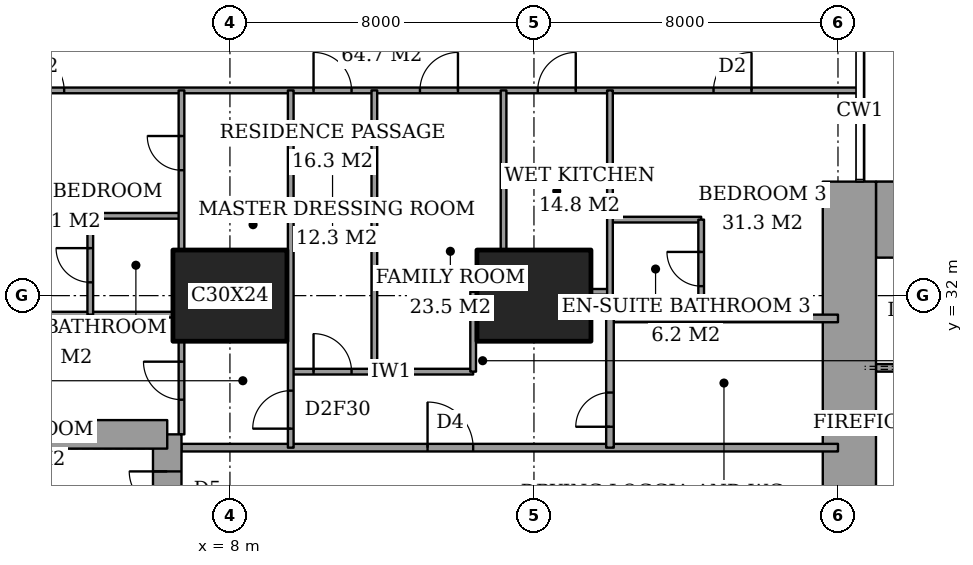
"""IFC4 building model, lengths in metres.
Left out: names, types, materials, properties, quantities, classifications, styles, units other than length and angle.
Written with IfcOpenShell. Run it as: python <this file> out.ifc"""

import sys

from ifc_helpers import new_model, si_unit, direction, frame, frame_2d, origin, origin_2d, place, context, subcontext, project, spatial, rectangle, extrude, element, fill, save


model = new_model("IFC4")
c1 = context("Model", 3, precision=1e-05, world=origin(), true_north=direction((0.0, 1.0)))
c2 = subcontext(c1, "Body", "Model", "MODEL_VIEW")
j1 = project(units=[si_unit("LENGTHUNIT", "METRE"), si_unit("PLANEANGLEUNIT", "RADIAN")], contexts=[c1])
p1 = place(None, origin())
s1 = spatial("IfcSite", under=j1, at=p1, CompositionType="ELEMENT")
p2 = place(p1, origin())
s2 = spatial("IfcBuilding", under=s1, at=p2, CompositionType="ELEMENT")
p3 = place(p2, frame((0.0, 0.0, 69.2)))
s3 = spatial("IfcBuildingStorey", under=s2, at=p3, CompositionType="ELEMENT", Elevation=69.2)
for number, where, z_axis, x_axis in (
    (1, (8.0, 32.0, 0.0), (0.0, 0.0, 1.0), (1.0, 0.0, 0.0)),
    (2, (16.0, 32.0, 0.0), (0.0, 0.0, 1.0), (1.0, 0.0, 0.0)),
):
    element("IfcColumn", number, at=place(p3, frame(where, z_axis=z_axis, x_axis=x_axis)), inside=s3, PredefinedType="COLUMN", context=c2, shape_type="SweptSolid", body=[
        extrude(rectangle(XDim=3.0, YDim=2.4, at=origin_2d()), origin(), (0.0, 0.0, 1.0), 3.6),
    ])
p4 = place(p3, frame((25.0, 34.0, 0.0), z_axis=(0.0, 0.0, 1.0), x_axis=(1.0, 0.0, 0.0)))
e3 = element("IfcWall", 3, at=p4, inside=s3, PredefinedType="SHEAR", context=c2, shape_type="SweptSolid", body=[
    extrude(rectangle(XDim=3.15, YDim=2.0, at=frame_2d((1.575, 0.0))), origin(), (0.0, 0.0, 1.0), 3.6),
])
p5 = place(p3, frame((24.3, 23.15, 0.0), z_axis=(0.0, 0.0, 1.0), x_axis=(0.0, 1.0, 0.0)))
e4 = element("IfcWall", 4, at=p5, inside=s3, PredefinedType="SHEAR", context=c2, shape_type="SweptSolid", body=[
    extrude(rectangle(XDim=11.85, YDim=1.4, at=frame_2d((5.925, 0.0))), origin(), (0.0, 0.0, 1.0), 3.6),
])
p6 = place(p5, frame((0.75, 0.0, 0.0)))
e5 = element("IfcOpeningElement", 5, at=p6, cuts=e4, PredefinedType="OPENING", context=c2, shape_type="SweptSolid", body=[
    extrude(rectangle(XDim=1.8, YDim=2.4, at=frame_2d((0.9, 1.2))), frame((0.0, 0.71, 0.0), z_axis=(0.0, -1.0, 0.0), x_axis=(1.0, 0.0, 0.0)), (0.0, 0.0, 1.0), 1.42),
])
p7 = place(p3, frame((6.35, 19.65, 0.0), z_axis=(0.0, 0.0, 1.0), x_axis=(0.0, 1.0, 0.0)))
e6 = element("IfcWall", 6, at=p7, inside=s3, PredefinedType="SHEAR", context=c2, shape_type="SweptSolid", body=[
    extrude(rectangle(XDim=8.7, YDim=0.75, at=frame_2d((4.35, 0.0))), origin(), (0.0, 0.0, 1.0), 3.6),
])
p8 = place(p7, frame((6.725, 0.0, 0.0)))
e7 = element("IfcOpeningElement", 7, at=p8, cuts=e6, PredefinedType="OPENING", context=c2, shape_type="SweptSolid", body=[
    extrude(rectangle(XDim=1.0, YDim=2.1, at=frame_2d((0.5, 1.05))), frame((0.0, 0.385, 0.0), z_axis=(0.0, -1.0, 0.0), x_axis=(1.0, 0.0, 0.0)), (0.0, 0.0, 1.0), 0.77),
])
p9 = place(p3, frame((6.35, 28.35, 0.0), z_axis=(0.0, 0.0, 1.0), x_axis=(-1.0, 0.0, 0.0)))
e8 = element("IfcWall", 8, at=p9, inside=s3, PredefinedType="SHEAR", context=c2, shape_type="SweptSolid", body=[
    extrude(rectangle(XDim=4.45, YDim=0.75, at=frame_2d((2.225, 0.0))), origin(), (0.0, 0.0, 1.0), 3.6),
])
p10 = place(p3, frame((6.725, 28.0, 0.0), z_axis=(0.0, 0.0, 1.0), x_axis=(1.0, 0.0, 0.0)))
e9 = element("IfcWall", 9, at=p10, inside=s3, PredefinedType="PARTITIONING", context=c2, shape_type="SweptSolid", body=[
    extrude(rectangle(XDim=17.275, YDim=0.2, at=frame_2d((8.637, 0.0))), origin(), (0.0, 0.0, 1.0), 3.35),
])
p11 = place(p10, frame((6.475, 0.0, 0.0)))
e10 = element("IfcOpeningElement", 10, at=p11, cuts=e9, PredefinedType="OPENING", context=c2, shape_type="SweptSolid", body=[
    extrude(rectangle(XDim=1.2, YDim=2.4, at=frame_2d((0.6, 1.2))), frame((0.0, 0.11, 0.0), z_axis=(0.0, -1.0, 0.0), x_axis=(1.0, 0.0, 0.0)), (0.0, 0.0, 1.0), 0.22),
])
p12 = place(p3, frame((9.6, 30.0, 0.0), z_axis=(0.0, 0.0, 1.0), x_axis=(1.0, 0.0, 0.0)))
e11 = element("IfcWall", 11, at=p12, inside=s3, PredefinedType="PARTITIONING", context=c2, shape_type="SweptSolid", body=[
    extrude(rectangle(XDim=4.8, YDim=0.15, at=frame_2d((2.4, 0.0))), origin(), (0.0, 0.0, 1.0), 3.35),
])
p13 = place(p12, frame((0.6, 0.0, 0.0)))
e12 = element("IfcOpeningElement", 12, at=p13, cuts=e11, PredefinedType="OPENING", context=c2, shape_type="SweptSolid", body=[
    extrude(rectangle(XDim=1.0, YDim=2.1, at=frame_2d((0.5, 1.05))), frame((0.0, 0.085, 0.0), z_axis=(0.0, -1.0, 0.0), x_axis=(1.0, 0.0, 0.0)), (0.0, 0.0, 1.0), 0.17),
])
p14 = place(p3, frame((18.0, 31.4, 0.0), z_axis=(0.0, 0.0, 1.0), x_axis=(1.0, 0.0, 0.0)))
e13 = element("IfcWall", 13, at=p14, inside=s3, PredefinedType="PARTITIONING", context=c2, shape_type="SweptSolid", body=[
    extrude(rectangle(XDim=6.0, YDim=0.2, at=frame_2d((3.0, 0.0))), origin(), (0.0, 0.0, 1.0), 3.35),
])
p15 = place(p3, frame((1.35, 31.5, 0.0), z_axis=(0.0, 0.0, 1.0), x_axis=(1.0, 0.0, 0.0)))
e14 = element("IfcWall", 14, at=p15, inside=s3, PredefinedType="PARTITIONING", context=c2, shape_type="SweptSolid", body=[
    extrude(rectangle(XDim=5.15, YDim=0.15, at=frame_2d((2.575, 0.0))), origin(), (0.0, 0.0, 1.0), 3.35),
])
p16 = place(p3, frame((17.5, 32.1, 0.0), z_axis=(0.0, 0.0, 1.0), x_axis=(1.0, 0.0, 0.0)))
e15 = element("IfcWall", 15, at=p16, inside=s3, PredefinedType="PARTITIONING", context=c2, shape_type="SweptSolid", body=[
    extrude(rectangle(XDim=0.5, YDim=0.15, at=frame_2d((0.25, 0.0))), origin(), (0.0, 0.0, 1.0), 2.634),
])
p17 = place(p3, frame((18.0, 34.0, 0.0), z_axis=(0.0, 0.0, 1.0), x_axis=(1.0, 0.0, 0.0)))
e16 = element("IfcWall", 16, at=p17, inside=s3, PredefinedType="PARTITIONING", context=c2, shape_type="SweptSolid", body=[
    extrude(rectangle(XDim=2.4, YDim=0.15, at=frame_2d((1.2, 0.0))), origin(), (0.0, 0.0, 1.0), 3.35),
])
p18 = place(p3, frame((4.325, 34.1, 0.0), z_axis=(0.0, 0.0, 1.0), x_axis=(1.0, 0.0, 0.0)))
e17 = element("IfcWall", 17, at=p18, inside=s3, PredefinedType="PARTITIONING", context=c2, shape_type="SweptSolid", body=[
    extrude(rectangle(XDim=2.4, YDim=0.15, at=frame_2d((1.2, 0.0))), origin(), (0.0, 0.0, 1.0), 3.35),
])
p19 = place(p3, frame((-0.45, 37.4, 0.0), z_axis=(0.0, 0.0, 1.0), x_axis=(1.0, 0.0, 0.0)))
e18 = element("IfcWall", 18, at=p19, inside=s3, PredefinedType="PARTITIONING", context=c2, shape_type="SweptSolid", body=[
    extrude(rectangle(XDim=25.011, YDim=0.15, at=frame_2d((12.505, 0.0))), origin(), (0.0, 0.0, 1.0), 3.35),
])
p20 = place(p19, frame((10.65, 0.0, 0.0)))
e19 = element("IfcOpeningElement", 19, at=p20, cuts=e18, PredefinedType="OPENING", context=c2, shape_type="SweptSolid", body=[
    extrude(rectangle(XDim=1.0, YDim=2.1, at=frame_2d((0.5, 1.05))), frame((0.0, 0.085, 0.0), z_axis=(0.0, -1.0, 0.0), x_axis=(1.0, 0.0, 0.0)), (0.0, 0.0, 1.0), 0.17),
])
p21 = place(p19, frame((3.087, 0.0, 0.0)))
e20 = element("IfcOpeningElement", 20, at=p21, cuts=e18, PredefinedType="OPENING", context=c2, shape_type="SweptSolid", body=[
    extrude(rectangle(XDim=1.0, YDim=2.1, at=frame_2d((0.5, 1.05))), frame((0.0, 0.085, 0.0), z_axis=(0.0, -1.0, 0.0), x_axis=(1.0, 0.0, 0.0)), (0.0, 0.0, 1.0), 0.17),
])
p22 = place(p19, frame((13.45, 0.0, 0.0)))
e21 = element("IfcOpeningElement", 21, at=p22, cuts=e18, PredefinedType="OPENING", context=c2, shape_type="SweptSolid", body=[
    extrude(rectangle(XDim=1.0, YDim=2.1, at=frame_2d((0.5, 1.05))), frame((0.0, 0.085, 0.0), z_axis=(0.0, -1.0, 0.0), x_axis=(1.0, 0.0, 0.0)), (0.0, 0.0, 1.0), 0.17),
])
p23 = place(p19, frame((16.55, 0.0, 0.0)))
e22 = element("IfcOpeningElement", 22, at=p23, cuts=e18, PredefinedType="OPENING", context=c2, shape_type="SweptSolid", body=[
    extrude(rectangle(XDim=1.0, YDim=2.1, at=frame_2d((0.5, 1.05))), frame((0.0, 0.085, 0.0), z_axis=(0.0, -1.0, 0.0), x_axis=(1.0, 0.0, 0.0)), (0.0, 0.0, 1.0), 0.17),
])
p24 = place(p19, frame((21.175, 0.0, 0.0)))
e23 = element("IfcOpeningElement", 23, at=p24, cuts=e18, PredefinedType="OPENING", context=c2, shape_type="SweptSolid", body=[
    extrude(rectangle(XDim=1.0, YDim=2.1, at=frame_2d((0.5, 1.05))), frame((0.0, 0.085, 0.0), z_axis=(0.0, -1.0, 0.0), x_axis=(1.0, 0.0, 0.0)), (0.0, 0.0, 1.0), 0.17),
])
p25 = place(p3, frame((4.325, 31.5, 0.0), z_axis=(0.0, 0.0, 1.0), x_axis=(0.0, 1.0, 0.0)))
e24 = element("IfcWall", 24, at=p25, inside=s3, PredefinedType="PARTITIONING", context=c2, shape_type="SweptSolid", body=[
    extrude(rectangle(XDim=2.6, YDim=0.15, at=frame_2d((1.3, 0.0))), origin(), (0.0, 0.0, 1.0), 3.35),
])
p26 = place(p25, frame((0.85, 0.0, 0.0)))
e25 = element("IfcOpeningElement", 25, at=p26, cuts=e24, PredefinedType="OPENING", context=c2, shape_type="SweptSolid", body=[
    extrude(rectangle(XDim=0.9, YDim=2.1, at=frame_2d((0.45, 1.05))), frame((0.0, 0.085, 0.0), z_axis=(0.0, -1.0, 0.0), x_axis=(1.0, 0.0, 0.0)), (0.0, 0.0, 1.0), 0.17),
])
p27 = place(p3, frame((6.725, 28.35, 0.0), z_axis=(0.0, 0.0, 1.0), x_axis=(0.0, 1.0, 0.0)))
e26 = element("IfcWall", 26, at=p27, inside=s3, PredefinedType="PARTITIONING", context=c2, shape_type="SweptSolid", body=[
    extrude(rectangle(XDim=2.45, YDim=0.15, at=frame_2d((1.225, 0.0))), origin(), (0.0, 0.0, 1.0), 3.35),
])
p28 = place(p27, frame((0.913, 0.0, 0.0)))
e27 = element("IfcOpeningElement", 27, at=p28, cuts=e26, PredefinedType="OPENING", context=c2, shape_type="SweptSolid", body=[
    extrude(rectangle(XDim=1.0, YDim=2.1, at=frame_2d((0.5, 1.05))), frame((0.0, 0.085, 0.0), z_axis=(0.0, -1.0, 0.0), x_axis=(1.0, 0.0, 0.0)), (0.0, 0.0, 1.0), 0.17),
])
p29 = place(p3, frame((6.725, 33.2, 0.0), z_axis=(0.0, 0.0, 1.0), x_axis=(0.0, 1.0, 0.0)))
e28 = element("IfcWall", 28, at=p29, inside=s3, PredefinedType="PARTITIONING", context=c2, shape_type="SweptSolid", body=[
    extrude(rectangle(XDim=4.2, YDim=0.15, at=frame_2d((2.1, 0.0))), origin(), (0.0, 0.0, 1.0), 3.35),
])
p30 = place(p29, frame((2.1, 0.0, 0.0)))
e29 = element("IfcOpeningElement", 29, at=p30, cuts=e28, PredefinedType="OPENING", context=c2, shape_type="SweptSolid", body=[
    extrude(rectangle(XDim=0.9, YDim=2.1, at=frame_2d((0.45, 1.05))), frame((0.0, 0.085, 0.0), z_axis=(0.0, -1.0, 0.0), x_axis=(1.0, 0.0, 0.0)), (0.0, 0.0, 1.0), 0.17),
])
p31 = place(p3, frame((9.6, 28.0, 0.0), z_axis=(0.0, 0.0, 1.0), x_axis=(0.0, 1.0, 0.0)))
e30 = element("IfcWall", 30, at=p31, inside=s3, PredefinedType="PARTITIONING", context=c2, shape_type="SweptSolid", body=[
    extrude(rectangle(XDim=9.4, YDim=0.15, at=frame_2d((4.7, 0.0))), origin(), (0.0, 0.0, 1.0), 3.35),
])
p32 = place(p31, frame((0.5, 0.0, 0.0)))
e31 = element("IfcOpeningElement", 31, at=p32, cuts=e30, PredefinedType="OPENING", context=c2, shape_type="SweptSolid", body=[
    extrude(rectangle(XDim=1.0, YDim=2.1, at=frame_2d((0.5, 1.05))), frame((0.0, 0.085, 0.0), z_axis=(0.0, -1.0, 0.0), x_axis=(1.0, 0.0, 0.0)), (0.0, 0.0, 1.0), 0.17),
])
p33 = place(p3, frame((11.8, 30.0, 0.0), z_axis=(0.0, 0.0, 1.0), x_axis=(0.0, 1.0, 0.0)))
e32 = element("IfcWall", 32, at=p33, inside=s3, PredefinedType="PARTITIONING", context=c2, shape_type="SweptSolid", body=[
    extrude(rectangle(XDim=7.4, YDim=0.15, at=frame_2d((3.7, 0.0))), origin(), (0.0, 0.0, 1.0), 3.35),
])
p34 = place(p3, frame((14.4, 30.0, 0.0), z_axis=(0.0, 0.0, 1.0), x_axis=(0.0, 1.0, 0.0)))
e33 = element("IfcWall", 33, at=p34, inside=s3, PredefinedType="PARTITIONING", context=c2, shape_type="SweptSolid", body=[
    extrude(rectangle(XDim=2.1, YDim=0.15, at=frame_2d((1.05, 0.0))), origin(), (0.0, 0.0, 1.0), 3.35),
])
p35 = place(p3, frame((15.2, 33.2, 0.0), z_axis=(0.0, 0.0, 1.0), x_axis=(0.0, 1.0, 0.0)))
e34 = element("IfcWall", 34, at=p35, inside=s3, PredefinedType="PARTITIONING", context=c2, shape_type="SweptSolid", body=[
    extrude(rectangle(XDim=4.2, YDim=0.15, at=frame_2d((2.1, 0.0))), origin(), (0.0, 0.0, 1.0), 3.35),
])
p36 = place(p3, frame((18.0, 28.0, 0.0), z_axis=(0.0, 0.0, 1.0), x_axis=(0.0, 1.0, 0.0)))
e35 = element("IfcWall", 35, at=p36, inside=s3, PredefinedType="PARTITIONING", context=c2, shape_type="SweptSolid", body=[
    extrude(rectangle(XDim=3.4, YDim=0.2, at=frame_2d((1.7, 0.0))), origin(), (0.0, 0.0, 1.0), 3.35),
])
p37 = place(p36, frame((0.55, 0.0, 0.0)))
e36 = element("IfcOpeningElement", 36, at=p37, cuts=e35, PredefinedType="OPENING", context=c2, shape_type="SweptSolid", body=[
    extrude(rectangle(XDim=0.9, YDim=2.1, at=frame_2d((0.45, 1.05))), frame((0.0, 0.11, 0.0), z_axis=(0.0, -1.0, 0.0), x_axis=(1.0, 0.0, 0.0)), (0.0, 0.0, 1.0), 0.22),
])
p38 = place(p3, frame((18.0, 31.4, 0.0), z_axis=(0.0, 0.0, 1.0), x_axis=(0.0, 1.0, 0.0)))
e37 = element("IfcWall", 37, at=p38, inside=s3, PredefinedType="PARTITIONING", context=c2, shape_type="SweptSolid", body=[
    extrude(rectangle(XDim=6.0, YDim=0.15, at=frame_2d((3.0, 0.0))), origin(), (0.0, 0.0, 1.0), 3.35),
])
p39 = place(p3, frame((20.4, 31.4, 0.0), z_axis=(0.0, 0.0, 1.0), x_axis=(0.0, 1.0, 0.0)))
e38 = element("IfcWall", 38, at=p39, inside=s3, PredefinedType="PARTITIONING", context=c2, shape_type="SweptSolid", body=[
    extrude(rectangle(XDim=2.6, YDim=0.15, at=frame_2d((1.3, 0.0))), origin(), (0.0, 0.0, 1.0), 3.35),
])
p40 = place(p39, frame((0.85, 0.0, 0.0)))
e39 = element("IfcOpeningElement", 39, at=p40, cuts=e38, PredefinedType="OPENING", context=c2, shape_type="SweptSolid", body=[
    extrude(rectangle(XDim=0.9, YDim=2.1, at=frame_2d((0.45, 1.05))), frame((0.0, 0.085, 0.0), z_axis=(0.0, -1.0, 0.0), x_axis=(1.0, 0.0, 0.0)), (0.0, 0.0, 1.0), 0.17),
])
p41 = place(p3, frame((25.0, 30.1, 0.0), z_axis=(0.0, 0.0, 1.0), x_axis=(1.0, 0.0, 0.0)))
e40 = element("IfcWall", 40, at=p41, inside=s3, PredefinedType="PARTITIONING", context=c2, shape_type="SweptSolid", body=[
    extrude(rectangle(XDim=12.7, YDim=0.2, at=frame_2d((6.35, 0.0))), origin(), (0.0, 0.0, 1.0), 3.6),
])
p42 = place(p41, frame((0.9, 0.0, 0.0)))
e41 = element("IfcOpeningElement", 41, at=p42, cuts=e40, PredefinedType="OPENING", context=c2, shape_type="SweptSolid", body=[
    extrude(rectangle(XDim=1.2, YDim=2.1, at=frame_2d((0.6, 1.05))), frame((0.0, 0.11, 0.0), z_axis=(0.0, -1.0, 0.0), x_axis=(1.0, 0.0, 0.0)), (0.0, 0.0, 1.0), 0.22),
])
p43 = place(p20, origin())
e42 = element("IfcDoor", 42, at=p43, inside=s3, OperationType="SINGLE_SWING_RIGHT", PredefinedType="DOOR", context=c2, shape_type="SweptSolid", body=[
    extrude(rectangle(XDim=1.0, YDim=2.1, at=frame_2d((0.5, 1.05))), frame((0.0, 0.025, 0.0), z_axis=(0.0, -1.0, 0.0), x_axis=(1.0, 0.0, 0.0)), (0.0, 0.0, 1.0), 0.05),
])
fill(e19, e42)
p44 = place(p26, origin())
e43 = element("IfcDoor", 43, at=p44, inside=s3, OperationType="SINGLE_SWING_LEFT", PredefinedType="DOOR", context=c2, shape_type="SweptSolid", body=[
    extrude(rectangle(XDim=0.9, YDim=2.1, at=frame_2d((0.45, 1.05))), frame((0.0, 0.025, 0.0), z_axis=(0.0, -1.0, 0.0), x_axis=(1.0, 0.0, 0.0)), (0.0, 0.0, 1.0), 0.05),
])
fill(e25, e43)
p45 = place(p21, origin())
e44 = element("IfcDoor", 44, at=p45, inside=s3, OperationType="SINGLE_SWING_RIGHT", PredefinedType="DOOR", context=c2, shape_type="SweptSolid", body=[
    extrude(rectangle(XDim=1.0, YDim=2.1, at=frame_2d((0.5, 1.05))), frame((0.0, 0.025, 0.0), z_axis=(0.0, -1.0, 0.0), x_axis=(1.0, 0.0, 0.0)), (0.0, 0.0, 1.0), 0.05),
])
fill(e20, e44)
p46 = place(p28, origin())
e45 = element("IfcDoor", 45, at=p46, inside=s3, OperationType="SINGLE_SWING_LEFT", PredefinedType="DOOR", context=c2, shape_type="SweptSolid", body=[
    extrude(rectangle(XDim=1.0, YDim=2.1, at=frame_2d((0.5, 1.05))), frame((0.0, 0.025, 0.0), z_axis=(0.0, -1.0, 0.0), x_axis=(1.0, 0.0, 0.0)), (0.0, 0.0, 1.0), 0.05),
])
fill(e27, e45)
p47 = place(p30, origin())
e46 = element("IfcDoor", 46, at=p47, inside=s3, OperationType="SINGLE_SWING_LEFT", PredefinedType="DOOR", context=c2, shape_type="SweptSolid", body=[
    extrude(rectangle(XDim=0.9, YDim=2.1, at=frame_2d((0.45, 1.05))), frame((0.0, 0.025, 0.0), z_axis=(0.0, -1.0, 0.0), x_axis=(1.0, 0.0, 0.0)), (0.0, 0.0, 1.0), 0.05),
])
fill(e29, e46)
p48 = place(p32, origin())
e47 = element("IfcDoor", 47, at=p48, inside=s3, OperationType="SINGLE_SWING_RIGHT", PredefinedType="DOOR", context=c2, shape_type="SweptSolid", body=[
    extrude(rectangle(XDim=1.0, YDim=2.1, at=frame_2d((0.5, 1.05))), frame((0.0, 0.025, 0.0), z_axis=(0.0, -1.0, 0.0), x_axis=(1.0, 0.0, 0.0)), (0.0, 0.0, 1.0), 0.05),
])
fill(e31, e47)
p49 = place(p11, origin())
e48 = element("IfcDoor", 48, at=p49, inside=s3, OperationType="SINGLE_SWING_RIGHT", PredefinedType="DOOR", context=c2, shape_type="SweptSolid", body=[
    extrude(rectangle(XDim=1.2, YDim=2.4, at=frame_2d((0.6, 1.2))), frame((0.0, 0.025, 0.0), z_axis=(0.0, -1.0, 0.0), x_axis=(1.0, 0.0, 0.0)), (0.0, 0.0, 1.0), 0.05),
])
fill(e10, e48)
p50 = place(p13, origin())
e49 = element("IfcDoor", 49, at=p50, inside=s3, OperationType="SINGLE_SWING_RIGHT", PredefinedType="DOOR", context=c2, shape_type="SweptSolid", body=[
    extrude(rectangle(XDim=1.0, YDim=2.1, at=frame_2d((0.5, 1.05))), frame((0.0, 0.025, 0.0), z_axis=(0.0, -1.0, 0.0), x_axis=(1.0, 0.0, 0.0)), (0.0, 0.0, 1.0), 0.05),
])
fill(e12, e49)
p51 = place(p22, origin())
e50 = element("IfcDoor", 50, at=p51, inside=s3, OperationType="SINGLE_SWING_LEFT", PredefinedType="DOOR", context=c2, shape_type="SweptSolid", body=[
    extrude(rectangle(XDim=1.0, YDim=2.1, at=frame_2d((0.5, 1.05))), frame((0.0, 0.025, 0.0), z_axis=(0.0, -1.0, 0.0), x_axis=(1.0, 0.0, 0.0)), (0.0, 0.0, 1.0), 0.05),
])
fill(e21, e50)
p52 = place(p23, origin())
e51 = element("IfcDoor", 51, at=p52, inside=s3, OperationType="SINGLE_SWING_LEFT", PredefinedType="DOOR", context=c2, shape_type="SweptSolid", body=[
    extrude(rectangle(XDim=1.0, YDim=2.1, at=frame_2d((0.5, 1.05))), frame((0.0, 0.025, 0.0), z_axis=(0.0, -1.0, 0.0), x_axis=(1.0, 0.0, 0.0)), (0.0, 0.0, 1.0), 0.05),
])
fill(e22, e51)
p53 = place(p40, origin())
e52 = element("IfcDoor", 52, at=p53, inside=s3, OperationType="SINGLE_SWING_LEFT", PredefinedType="DOOR", context=c2, shape_type="SweptSolid", body=[
    extrude(rectangle(XDim=0.9, YDim=2.1, at=frame_2d((0.45, 1.05))), frame((0.0, 0.025, 0.0), z_axis=(0.0, -1.0, 0.0), x_axis=(1.0, 0.0, 0.0)), (0.0, 0.0, 1.0), 0.05),
])
fill(e39, e52)
p54 = place(p24, origin())
e53 = element("IfcDoor", 53, at=p54, inside=s3, OperationType="SINGLE_SWING_LEFT", PredefinedType="DOOR", context=c2, shape_type="SweptSolid", body=[
    extrude(rectangle(XDim=1.0, YDim=2.1, at=frame_2d((0.5, 1.05))), frame((0.0, 0.025, 0.0), z_axis=(0.0, -1.0, 0.0), x_axis=(1.0, 0.0, 0.0)), (0.0, 0.0, 1.0), 0.05),
])
fill(e23, e53)
p55 = place(p37, origin())
e54 = element("IfcDoor", 54, at=p55, inside=s3, OperationType="SINGLE_SWING_RIGHT", PredefinedType="DOOR", context=c2, shape_type="SweptSolid", body=[
    extrude(rectangle(XDim=0.9, YDim=2.1, at=frame_2d((0.45, 1.05))), frame((0.0, 0.025, 0.0), z_axis=(0.0, -1.0, 0.0), x_axis=(1.0, 0.0, 0.0)), (0.0, 0.0, 1.0), 0.05),
])
fill(e36, e54)
p56 = place(p8, origin())
e55 = element("IfcDoor", 55, at=p56, inside=s3, OperationType="SINGLE_SWING_LEFT", PredefinedType="DOOR", context=c2, shape_type="SweptSolid", body=[
    extrude(rectangle(XDim=1.0, YDim=2.1, at=frame_2d((0.5, 1.05))), frame((0.0, 0.025, 0.0), z_axis=(0.0, -1.0, 0.0), x_axis=(1.0, 0.0, 0.0)), (0.0, 0.0, 1.0), 0.05),
])
fill(e7, e55)
save(model, sys.argv[1])
